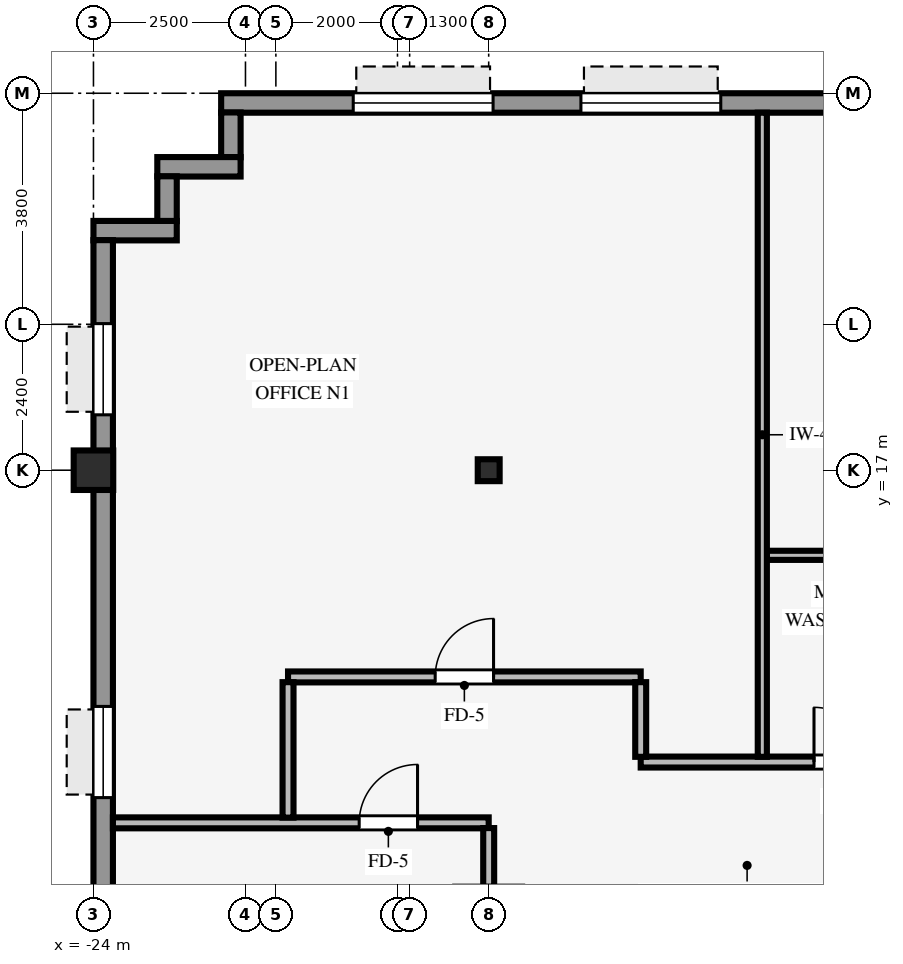
"""IFC4 building model, lengths in metres.
Left out: names, types, materials, properties, quantities, classifications, styles, units other than length and angle.
Written with IfcOpenShell. Run it as: python <this file> out.ifc"""

import sys

from ifc_helpers import new_model, si_unit, direction, frame, frame_2d, origin, origin_2d, place, context, subcontext, project, spatial, rectangle, hollow_rectangle, i_section, extrude, source, transform, mapped, element, fill, save


model = new_model("IFC4")
c1 = context("Model", 3, precision=1e-05, world=origin(), true_north=direction((0.0, 1.0)))
c2 = subcontext(c1, "Body", "Model", "MODEL_VIEW")
j1 = project(units=[si_unit("LENGTHUNIT", "METRE"), si_unit("PLANEANGLEUNIT", "RADIAN")], contexts=[c1])
p1 = place(None, origin())
s1 = spatial("IfcSite", under=j1, at=p1, CompositionType="ELEMENT")
p2 = place(p1, origin())
s2 = spatial("IfcBuilding", under=s1, at=p2, CompositionType="ELEMENT")
p3 = place(p2, frame((0.0, 0.0, 101.95)))
s3 = spatial("IfcBuildingStorey", under=s2, at=p3, CompositionType="ELEMENT", Elevation=101.95)
p4 = place(p3, frame((-24.0, 17.0, 0.0), z_axis=(0.0, 0.0, 1.0), x_axis=(1.0, 0.0, 0.0)))
e1 = element("IfcColumn", 1, at=p4, inside=s3, PredefinedType="COLUMN", context=c2, shape_type="SweptSolid", body=[
    extrude(hollow_rectangle(XDim=0.65, YDim=0.65, WallThickness=0.04, InnerFilletRadius=0.04, OuterFilletRadius=0.08, at=origin_2d()), origin(), (0.0, 0.0, 1.0), 3.37),
])
p5 = place(p3, frame((-17.5, 17.0, 0.0), z_axis=(0.0, 0.0, 1.0), x_axis=(1.0, 0.0, 0.0)))
e2 = element("IfcColumn", 2, at=p5, inside=s3, PredefinedType="COLUMN", context=c2, shape_type="SweptSolid", body=[
    extrude(i_section(OverallWidth=0.36, OverallDepth=0.36, WebThickness=0.021, FlangeThickness=0.021, FilletRadius=0.018, at=origin_2d()), origin(), (0.0, 0.0, 1.0), 3.37),
])
p6 = place(p3, frame((-21.9, 23.04, 0.0), z_axis=(0.0, 0.0, 1.0), x_axis=(1.0, 0.0, 0.0)))
e3 = element("IfcWall", 3, at=p6, inside=s3, PredefinedType="STANDARD", context=c2, shape_type="SweptSolid", body=[
    extrude(rectangle(XDim=43.8, YDim=0.32, at=frame_2d((21.9, 0.0))), origin(), (0.0, 0.0, 1.0), 2.705),
])
p7 = place(p6, frame((26.85, 0.0, 0.0)))
e4 = element("IfcOpeningElement", 4, at=p7, cuts=e3, PredefinedType="OPENING", context=c2, shape_type="SweptSolid", body=[
    extrude(rectangle(XDim=1.05, YDim=2.1, at=frame_2d((0.525, 1.05))), frame((0.0, 0.17, 0.0), z_axis=(0.0, -1.0, 0.0), x_axis=(1.0, 0.0, 0.0)), (0.0, 0.0, 1.0), 0.34),
])
p8 = place(p6, frame((2.172, 0.0, 0.8)))
e5 = element("IfcOpeningElement", 5, at=p8, cuts=e3, PredefinedType="OPENING", context=c2, shape_type="SweptSolid", body=[
    extrude(rectangle(XDim=2.3, YDim=1.62, at=frame_2d((1.15, 0.81))), frame((0.0, 0.17, 0.0), z_axis=(0.0, -1.0, 0.0), x_axis=(1.0, 0.0, 0.0)), (0.0, 0.0, 1.0), 0.34),
])
p9 = place(p6, frame((5.917, 0.0, 0.8)))
e6 = element("IfcOpeningElement", 6, at=p9, cuts=e3, PredefinedType="OPENING", context=c2, shape_type="SweptSolid", body=[
    extrude(rectangle(XDim=2.3, YDim=1.62, at=frame_2d((1.15, 0.81))), frame((0.0, 0.17, 0.0), z_axis=(0.0, -1.0, 0.0), x_axis=(1.0, 0.0, 0.0)), (0.0, 0.0, 1.0), 0.34),
])
p10 = place(p6, frame((16.106, 0.0, 0.8)))
e7 = element("IfcOpeningElement", 7, at=p10, cuts=e3, PredefinedType="OPENING", context=c2, shape_type="SweptSolid", body=[
    extrude(rectangle(XDim=2.3, YDim=1.62, at=frame_2d((1.15, 0.81))), frame((0.0, 0.17, 0.0), z_axis=(0.0, -1.0, 0.0), x_axis=(1.0, 0.0, 0.0)), (0.0, 0.0, 1.0), 0.34),
])
p11 = place(p6, frame((34.683, 0.0, 0.8)))
e8 = element("IfcOpeningElement", 8, at=p11, cuts=e3, PredefinedType="OPENING", context=c2, shape_type="SweptSolid", body=[
    extrude(rectangle(XDim=2.3, YDim=1.62, at=frame_2d((1.15, 0.81))), frame((0.0, 0.17, 0.0), z_axis=(0.0, -1.0, 0.0), x_axis=(1.0, 0.0, 0.0)), (0.0, 0.0, 1.0), 0.34),
])
p12 = place(p6, frame((39.328, 0.0, 0.8)))
e9 = element("IfcOpeningElement", 9, at=p12, cuts=e3, PredefinedType="OPENING", context=c2, shape_type="SweptSolid", body=[
    extrude(rectangle(XDim=2.3, YDim=1.62, at=frame_2d((1.15, 0.81))), frame((0.0, 0.17, 0.0), z_axis=(0.0, -1.0, 0.0), x_axis=(1.0, 0.0, 0.0)), (0.0, 0.0, 1.0), 0.34),
])
p13 = place(p3, frame((-21.74, 22.146, 0.0), z_axis=(0.0, 0.0, 1.0), x_axis=(0.0, 1.0, 0.0)))
e10 = element("IfcWall", 10, at=p13, inside=s3, PredefinedType="STANDARD", context=c2, shape_type="SweptSolid", body=[
    extrude(rectangle(XDim=0.738, YDim=0.32, at=frame_2d((0.369, 0.0))), origin(), (0.0, 0.0, 1.0), 3.36),
])
p14 = place(p3, frame((-22.95, 21.99, 0.0), z_axis=(0.0, 0.0, 1.0), x_axis=(1.0, 0.0, 0.0)))
e11 = element("IfcWall", 11, at=p14, inside=s3, PredefinedType="STANDARD", context=c2, shape_type="SweptSolid", body=[
    extrude(rectangle(XDim=1.37, YDim=0.32, at=frame_2d((0.685, 0.0))), origin(), (0.0, 0.0, 1.0), 3.36),
])
p15 = place(p3, frame((-22.79, 21.096, 0.0), z_axis=(0.0, 0.0, 1.0), x_axis=(0.0, 1.0, 0.0)))
e12 = element("IfcWall", 12, at=p15, inside=s3, PredefinedType="STANDARD", context=c2, shape_type="SweptSolid", body=[
    extrude(rectangle(XDim=0.738, YDim=0.32, at=frame_2d((0.369, 0.0))), origin(), (0.0, 0.0, 1.0), 3.36),
])
p16 = place(p3, frame((-24.0, 20.94, 0.0), z_axis=(0.0, 0.0, 1.0), x_axis=(1.0, 0.0, 0.0)))
e13 = element("IfcWall", 13, at=p16, inside=s3, PredefinedType="STANDARD", context=c2, shape_type="SweptSolid", body=[
    extrude(rectangle(XDim=1.37, YDim=0.32, at=frame_2d((0.685, 0.0))), origin(), (0.0, 0.0, 1.0), 3.36),
])
p17 = place(p3, frame((-23.84, -20.784, 0.0), z_axis=(0.0, 0.0, 1.0), x_axis=(0.0, 1.0, 0.0)))
e14 = element("IfcWall", 14, at=p17, inside=s3, PredefinedType="STANDARD", context=c2, shape_type="SweptSolid", body=[
    extrude(rectangle(XDim=41.568, YDim=0.32, at=frame_2d((20.784, 0.0))), origin(), (0.0, 0.0, 1.0), 2.705),
])
p18 = place(p17, frame((1.373, 0.0, 0.8)))
e15 = element("IfcOpeningElement", 15, at=p18, cuts=e14, PredefinedType="OPENING", context=c2, shape_type="SweptSolid", body=[
    extrude(rectangle(XDim=1.5, YDim=1.6, at=frame_2d((0.75, 0.8))), frame((0.0, 0.17, 0.0), z_axis=(0.0, -1.0, 0.0), x_axis=(1.0, 0.0, 0.0)), (0.0, 0.0, 1.0), 0.34),
])
p19 = place(p17, frame((7.669, 0.0, 0.8)))
e16 = element("IfcOpeningElement", 16, at=p19, cuts=e14, PredefinedType="OPENING", context=c2, shape_type="SweptSolid", body=[
    extrude(rectangle(XDim=1.5, YDim=1.6, at=frame_2d((0.75, 0.8))), frame((0.0, 0.17, 0.0), z_axis=(0.0, -1.0, 0.0), x_axis=(1.0, 0.0, 0.0)), (0.0, 0.0, 1.0), 0.34),
])
p20 = place(p17, frame((12.615, 0.0, 0.8)))
e17 = element("IfcOpeningElement", 17, at=p20, cuts=e14, PredefinedType="OPENING", context=c2, shape_type="SweptSolid", body=[
    extrude(rectangle(XDim=1.5, YDim=1.6, at=frame_2d((0.75, 0.8))), frame((0.0, 0.17, 0.0), z_axis=(0.0, -1.0, 0.0), x_axis=(1.0, 0.0, 0.0)), (0.0, 0.0, 1.0), 0.34),
])
p21 = place(p17, frame((17.561, 0.0, 0.8)))
e18 = element("IfcOpeningElement", 18, at=p21, cuts=e14, PredefinedType="OPENING", context=c2, shape_type="SweptSolid", body=[
    extrude(rectangle(XDim=1.5, YDim=1.6, at=frame_2d((0.75, 0.8))), frame((0.0, 0.17, 0.0), z_axis=(0.0, -1.0, 0.0), x_axis=(1.0, 0.0, 0.0)), (0.0, 0.0, 1.0), 0.34),
])
p22 = place(p17, frame((22.507, 0.0, 0.8)))
e19 = element("IfcOpeningElement", 19, at=p22, cuts=e14, PredefinedType="OPENING", context=c2, shape_type="SweptSolid", body=[
    extrude(rectangle(XDim=1.5, YDim=1.6, at=frame_2d((0.75, 0.8))), frame((0.0, 0.17, 0.0), z_axis=(0.0, -1.0, 0.0), x_axis=(1.0, 0.0, 0.0)), (0.0, 0.0, 1.0), 0.34),
])
p23 = place(p17, frame((27.453, 0.0, 0.8)))
e20 = element("IfcOpeningElement", 20, at=p23, cuts=e14, PredefinedType="OPENING", context=c2, shape_type="SweptSolid", body=[
    extrude(rectangle(XDim=1.5, YDim=1.6, at=frame_2d((0.75, 0.8))), frame((0.0, 0.17, 0.0), z_axis=(0.0, -1.0, 0.0), x_axis=(1.0, 0.0, 0.0)), (0.0, 0.0, 1.0), 0.34),
])
p24 = place(p17, frame((32.399, 0.0, 0.8)))
e21 = element("IfcOpeningElement", 21, at=p24, cuts=e14, PredefinedType="OPENING", context=c2, shape_type="SweptSolid", body=[
    extrude(rectangle(XDim=1.5, YDim=1.6, at=frame_2d((0.75, 0.8))), frame((0.0, 0.17, 0.0), z_axis=(0.0, -1.0, 0.0), x_axis=(1.0, 0.0, 0.0)), (0.0, 0.0, 1.0), 0.34),
])
p25 = place(p17, frame((38.695, 0.0, 0.8)))
e22 = element("IfcOpeningElement", 22, at=p25, cuts=e14, PredefinedType="OPENING", context=c2, shape_type="SweptSolid", body=[
    extrude(rectangle(XDim=1.5, YDim=1.6, at=frame_2d((0.75, 0.8))), frame((0.0, 0.17, 0.0), z_axis=(0.0, -1.0, 0.0), x_axis=(1.0, 0.0, 0.0)), (0.0, 0.0, 1.0), 0.34),
])
p26 = place(p3, frame((-23.68, 11.2, 0.0), z_axis=(0.0, 0.0, 1.0), x_axis=(1.0, 0.0, 0.0)))
e23 = element("IfcWall", 23, at=p26, inside=s3, PredefinedType="PARTITIONING", context=c2, shape_type="SweptSolid", body=[
    extrude(rectangle(XDim=6.18, YDim=0.18, at=frame_2d((3.09, 0.0))), origin(), (0.0, 0.0, 1.0), 3.36),
])
p27 = place(p26, frame((4.05, 0.0, 0.0)))
e24 = element("IfcOpeningElement", 24, at=p27, cuts=e23, PredefinedType="OPENING", context=c2, shape_type="SweptSolid", body=[
    extrude(rectangle(XDim=0.96, YDim=2.1, at=frame_2d((0.48, 1.05))), frame((0.0, 0.1, 0.0), z_axis=(0.0, -1.0, 0.0), x_axis=(1.0, 0.0, 0.0)), (0.0, 0.0, 1.0), 0.2),
])
p28 = place(p3, frame((-15.0, 12.2, 0.0), z_axis=(0.0, 0.0, 1.0), x_axis=(1.0, 0.0, 0.0)))
e25 = element("IfcWall", 25, at=p28, inside=s3, PredefinedType="PARTITIONING", context=c2, shape_type="SweptSolid", body=[
    extrude(rectangle(XDim=30.0, YDim=0.18, at=frame_2d((15.0, 0.0))), origin(), (0.0, 0.0, 1.0), 3.36),
])
p29 = place(p28, frame((23.02, 0.0, 0.0)))
e26 = element("IfcOpeningElement", 26, at=p29, cuts=e25, PredefinedType="OPENING", context=c2, shape_type="SweptSolid", body=[
    extrude(rectangle(XDim=0.96, YDim=2.1, at=frame_2d((0.48, 1.05))), frame((0.0, 0.1, 0.0), z_axis=(0.0, -1.0, 0.0), x_axis=(1.0, 0.0, 0.0)), (0.0, 0.0, 1.0), 0.2),
])
p30 = place(p28, frame((16.45, 0.0, 0.0)))
e27 = element("IfcOpeningElement", 27, at=p30, cuts=e25, PredefinedType="OPENING", context=c2, shape_type="SweptSolid", body=[
    extrude(rectangle(XDim=0.96, YDim=2.1, at=frame_2d((0.48, 1.05))), frame((0.0, 0.1, 0.0), z_axis=(0.0, -1.0, 0.0), x_axis=(1.0, 0.0, 0.0)), (0.0, 0.0, 1.0), 0.2),
])
p31 = place(p28, frame((5.45, 0.0, 0.0)))
e28 = element("IfcOpeningElement", 28, at=p31, cuts=e25, PredefinedType="OPENING", context=c2, shape_type="SweptSolid", body=[
    extrude(rectangle(XDim=0.9, YDim=2.1, at=frame_2d((0.45, 1.05))), frame((0.0, 0.1, 0.0), z_axis=(0.0, -1.0, 0.0), x_axis=(1.0, 0.0, 0.0)), (0.0, 0.0, 1.0), 0.2),
])
p32 = place(p28, frame((2.85, 0.0, 0.0)))
e29 = element("IfcOpeningElement", 29, at=p32, cuts=e25, PredefinedType="OPENING", context=c2, shape_type="SweptSolid", body=[
    extrude(rectangle(XDim=0.9, YDim=2.1, at=frame_2d((0.45, 1.05))), frame((0.0, 0.1, 0.0), z_axis=(0.0, -1.0, 0.0), x_axis=(1.0, 0.0, 0.0)), (0.0, 0.0, 1.0), 0.2),
])
p33 = place(p28, frame((12.52, 0.0, 0.0)))
e30 = element("IfcOpeningElement", 30, at=p33, cuts=e25, PredefinedType="OPENING", context=c2, shape_type="SweptSolid", body=[
    extrude(rectangle(XDim=0.96, YDim=2.1, at=frame_2d((0.48, 1.05))), frame((0.0, 0.1, 0.0), z_axis=(0.0, -1.0, 0.0), x_axis=(1.0, 0.0, 0.0)), (0.0, 0.0, 1.0), 0.2),
])
p34 = place(p28, frame((7.95, 0.0, 0.0)))
e31 = element("IfcOpeningElement", 31, at=p34, cuts=e25, PredefinedType="OPENING", context=c2, shape_type="SweptSolid", body=[
    extrude(rectangle(XDim=0.9, YDim=2.1, at=frame_2d((0.45, 1.05))), frame((0.0, 0.1, 0.0), z_axis=(0.0, -1.0, 0.0), x_axis=(1.0, 0.0, 0.0)), (0.0, 0.0, 1.0), 0.2),
])
p35 = place(p3, frame((-20.8, 13.6, 0.0), z_axis=(0.0, 0.0, 1.0), x_axis=(1.0, 0.0, 0.0)))
e32 = element("IfcWall", 32, at=p35, inside=s3, PredefinedType="PARTITIONING", context=c2, shape_type="SweptSolid", body=[
    extrude(rectangle(XDim=5.8, YDim=0.18, at=frame_2d((2.9, 0.0))), origin(), (0.0, 0.0, 1.0), 2.998),
])
p36 = place(p35, frame((2.42, 0.0, 0.0)))
e33 = element("IfcOpeningElement", 33, at=p36, cuts=e32, PredefinedType="OPENING", context=c2, shape_type="SweptSolid", body=[
    extrude(rectangle(XDim=0.96, YDim=2.1, at=frame_2d((0.48, 1.05))), frame((0.0, 0.1, 0.0), z_axis=(0.0, -1.0, 0.0), x_axis=(1.0, 0.0, 0.0)), (0.0, 0.0, 1.0), 0.2),
])
p37 = place(p3, frame((-12.929, 15.6, 0.0), z_axis=(0.0, 0.0, 1.0), x_axis=(1.0, 0.0, 0.0)))
e34 = element("IfcWall", 34, at=p37, inside=s3, PredefinedType="PARTITIONING", context=c2, shape_type="SweptSolid", body=[
    extrude(rectangle(XDim=7.529, YDim=0.15, at=frame_2d((3.765, 0.0))), origin(), (0.0, 0.0, 1.0), 3.36),
])
p38 = place(p3, frame((-20.8, 11.286, 0.0), z_axis=(0.0, 0.0, 1.0), x_axis=(0.0, 1.0, 0.0)))
e35 = element("IfcWall", 35, at=p38, inside=s3, PredefinedType="PARTITIONING", context=c2, shape_type="SweptSolid", body=[
    extrude(rectangle(XDim=2.228, YDim=0.18, at=frame_2d((1.114, 0.0))), origin(), (0.0, 0.0, 1.0), 3.36),
])
p39 = place(p3, frame((-17.5, 10.146, 0.0), z_axis=(0.0, 0.0, 1.0), x_axis=(0.0, 1.0, 0.0)))
e36 = element("IfcWall", 36, at=p39, inside=s3, PredefinedType="PARTITIONING", context=c2, shape_type="SweptSolid", body=[
    extrude(rectangle(XDim=0.968, YDim=0.18, at=frame_2d((0.484, 0.0))), origin(), (0.0, 0.0, 1.0), 2.738),
])
p40 = place(p3, frame((-15.0, 12.286, 0.0), z_axis=(0.0, 0.0, 1.0), x_axis=(0.0, 1.0, 0.0)))
e37 = element("IfcWall", 37, at=p40, inside=s3, PredefinedType="PARTITIONING", context=c2, shape_type="SweptSolid", body=[
    extrude(rectangle(XDim=1.228, YDim=0.18, at=frame_2d((0.614, 0.0))), origin(), (0.0, 0.0, 1.0), 3.36),
])
p41 = place(p3, frame((-13.0, 12.286, 0.0), z_axis=(0.0, 0.0, 1.0), x_axis=(0.0, 1.0, 0.0)))
e38 = element("IfcWall", 38, at=p41, inside=s3, PredefinedType="PARTITIONING", context=c2, shape_type="SweptSolid", body=[
    extrude(rectangle(XDim=10.594, YDim=0.15, at=frame_2d((5.297, 0.0))), origin(), (0.0, 0.0, 1.0), 3.36),
])
m1 = source(origin(), c2, "Body", "SweptSolid", [
    extrude(rectangle(XDim=2.3, YDim=1.62, at=frame_2d((1.15, 0.81))), frame((0.0, 0.03, 0.0), z_axis=(0.0, -1.0, 0.0), x_axis=(1.0, 0.0, 0.0)), (0.0, 0.0, 1.0), 0.06),
])
p42 = place(p8, origin())
e39 = element("IfcWindow", 39, at=p42, inside=s3, PartitioningType="SINGLE_PANEL", PredefinedType="WINDOW", context=c2, shape_type="MappedRepresentation", body=[
    mapped(m1, transform((0.0, 0.0, 0.0), scale=1.0)),
])
fill(e5, e39)
p43 = place(p9, origin())
e40 = element("IfcWindow", 40, at=p43, inside=s3, PartitioningType="SINGLE_PANEL", PredefinedType="WINDOW", context=c2, shape_type="MappedRepresentation", body=[
    mapped(m1, transform((0.0, 0.0, 0.0), scale=1.0)),
])
fill(e6, e40)
m2 = source(origin(), c2, "Body", "SweptSolid", [
    extrude(rectangle(XDim=1.5, YDim=1.6, at=frame_2d((0.75, 0.8))), frame((0.0, 0.03, 0.0), z_axis=(0.0, -1.0, 0.0), x_axis=(1.0, 0.0, 0.0)), (0.0, 0.0, 1.0), 0.06),
])
p44 = place(p24, origin())
e41 = element("IfcWindow", 41, at=p44, inside=s3, PartitioningType="SINGLE_PANEL", PredefinedType="WINDOW", context=c2, shape_type="MappedRepresentation", body=[
    mapped(m2, transform((0.0, 0.0, 0.0), scale=1.0)),
])
fill(e21, e41)
p45 = place(p25, origin())
e42 = element("IfcWindow", 42, at=p45, inside=s3, PartitioningType="SINGLE_PANEL", PredefinedType="WINDOW", context=c2, shape_type="MappedRepresentation", body=[
    mapped(m2, transform((0.0, 0.0, 0.0), scale=1.0)),
])
fill(e22, e42)
m3 = source(origin(), c2, "Body", "SweptSolid", [
    extrude(rectangle(XDim=0.96, YDim=2.1, at=frame_2d((0.48, 1.05))), frame((0.0, 0.025, 0.0), z_axis=(0.0, -1.0, 0.0), x_axis=(1.0, 0.0, 0.0)), (0.0, 0.0, 1.0), 0.05),
])
p46 = place(p36, origin())
e43 = element("IfcDoor", 43, at=p46, inside=s3, OperationType="SINGLE_SWING_RIGHT", PredefinedType="DOOR", context=c2, shape_type="MappedRepresentation", body=[
    mapped(m3, transform((0.0, 0.0, 0.0), scale=1.0)),
])
fill(e33, e43)
p47 = place(p27, origin())
e44 = element("IfcDoor", 44, at=p47, inside=s3, OperationType="SINGLE_SWING_RIGHT", PredefinedType="DOOR", context=c2, shape_type="MappedRepresentation", body=[
    mapped(m3, transform((0.0, 0.0, 0.0), scale=1.0)),
])
fill(e24, e44)
m4 = source(origin(), c2, "Body", "SweptSolid", [
    extrude(rectangle(XDim=0.9, YDim=2.1, at=frame_2d((0.45, 1.05))), frame((0.0, 0.025, 0.0), z_axis=(0.0, -1.0, 0.0), x_axis=(1.0, 0.0, 0.0)), (0.0, 0.0, 1.0), 0.05),
])
p48 = place(p32, origin())
e45 = element("IfcDoor", 45, at=p48, inside=s3, OperationType="SINGLE_SWING_LEFT", PredefinedType="DOOR", context=c2, shape_type="MappedRepresentation", body=[
    mapped(m4, transform((0.0, 0.0, 0.0), scale=1.0)),
])
fill(e29, e45)
save(model, sys.argv[1])
